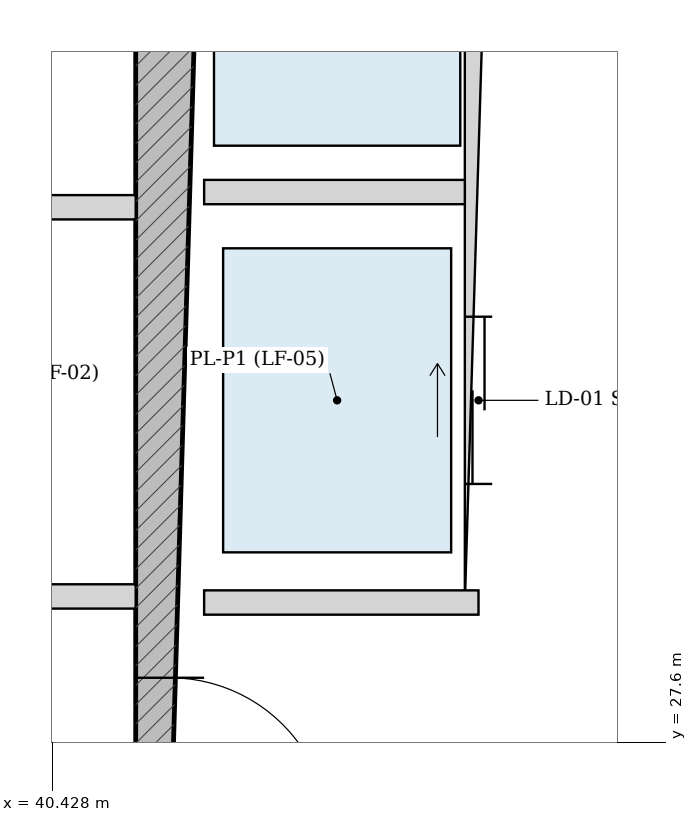
"""IFC4 building model, lengths in metres.
Left out: names, types, materials, properties, quantities, classifications, styles, units other than length and angle.
Written with IfcOpenShell. Run it as: python <this file> out.ifc"""

import sys

from ifc_helpers import new_model, si_unit, direction, frame, frame_2d, origin, place, context, subcontext, project, spatial, rectangle, extrude, source, transform, mapped, element, fill, save


model = new_model("IFC4")
c1 = context("Model", 3, precision=1e-05, world=origin(), true_north=direction((-0.2419218956, 0.970295726276)))
c2 = subcontext(c1, "Body", "Model", "MODEL_VIEW")
j1 = project(units=[si_unit("LENGTHUNIT", "METRE"), si_unit("PLANEANGLEUNIT", "RADIAN")], contexts=[c1])
p1 = place(None, origin())
s1 = spatial("IfcSite", under=j1, at=p1, CompositionType="ELEMENT")
p2 = place(p1, origin())
s2 = spatial("IfcBuilding", under=s1, at=p2, CompositionType="ELEMENT")
p3 = place(p2, frame((0.0, 0.0, 18.9)))
s3 = spatial("IfcBuildingStorey", under=s2, at=p3, CompositionType="ELEMENT", Elevation=18.9)
p4 = place(p3, frame((41.2, 19.175, 0.0), z_axis=(0.0, 0.0, 1.0), x_axis=(0.0, 1.0, 0.0)))
e1 = element("IfcWall", 1, at=p4, inside=s3, PredefinedType="SHEAR", context=c2, shape_type="SweptSolid", body=[
    extrude(rectangle(XDim=15.25, YDim=0.45, at=frame_2d((7.625, 0.0))), origin(), (0.0, 0.0, 1.0), 4.82),
])
p5 = place(p4, frame((7.8, 0.0, 0.0)))
e2 = element("IfcOpeningElement", 2, at=p5, cuts=e1, PredefinedType="OPENING", context=c2, shape_type="SweptSolid", body=[
    extrude(rectangle(XDim=1.05, YDim=2.15, at=frame_2d((0.525, 1.075))), frame((0.0, 0.235, 0.0), z_axis=(0.0, -1.0, 0.0), x_axis=(1.0, 0.0, 0.0)), (0.0, 0.0, 1.0), 0.47),
])
p6 = place(p3, frame((43.23, 28.52, 0.0), z_axis=(0.0, 0.0, 1.0), x_axis=(0.0, 1.0, 0.0)))
e3 = element("IfcWall", 3, at=p6, inside=s3, PredefinedType="PARTITIONING", context=c2, shape_type="SweptSolid", body=[
    extrude(rectangle(XDim=5.905, YDim=0.18, at=frame_2d((2.953, 0.0))), origin(), (0.0, 0.0, 1.0), 4.82),
])
p7 = place(p6, frame((3.655, 0.0, 0.0)))
e4 = element("IfcOpeningElement", 4, at=p7, cuts=e3, PredefinedType="OPENING", context=c2, shape_type="SweptSolid", body=[
    extrude(rectangle(XDim=1.15, YDim=2.2, at=frame_2d((0.575, 1.1))), frame((0.0, 0.1, 0.0), z_axis=(0.0, -1.0, 0.0), x_axis=(1.0, 0.0, 0.0)), (0.0, 0.0, 1.0), 0.2),
])
p8 = place(p6, frame((0.78, 0.0, 0.0)))
e5 = element("IfcOpeningElement", 5, at=p8, cuts=e3, PredefinedType="OPENING", context=c2, shape_type="SweptSolid", body=[
    extrude(rectangle(XDim=1.1, YDim=2.2, at=frame_2d((0.55, 1.1))), frame((0.0, 0.1, 0.0), z_axis=(0.0, -1.0, 0.0), x_axis=(1.0, 0.0, 0.0)), (0.0, 0.0, 1.0), 0.2),
])
p9 = place(p3, frame((41.425, 31.22, 0.0), z_axis=(0.0, 0.0, 1.0), x_axis=(1.0, 0.0, 0.0)))
e6 = element("IfcWall", 6, at=p9, inside=s3, PredefinedType="PARTITIONING", context=c2, shape_type="SweptSolid", body=[
    extrude(rectangle(XDim=1.715, YDim=0.16, at=frame_2d((0.857, 0.0))), origin(), (0.0, 0.0, 1.0), 4.82),
])
p10 = place(p3, frame((41.425, 28.52, 0.0), z_axis=(0.0, 0.0, 1.0), x_axis=(1.0, 0.0, 0.0)))
e7 = element("IfcWall", 7, at=p10, inside=s3, PredefinedType="PARTITIONING", context=c2, shape_type="SweptSolid", body=[
    extrude(rectangle(XDim=1.805, YDim=0.16, at=frame_2d((0.902, 0.0))), origin(), (0.0, 0.0, 1.0), 4.82),
])
p11 = place(p3, frame((35.025, 28.56, 0.0), z_axis=(0.0, 0.0, 1.0), x_axis=(1.0, 0.0, 0.0)))
e8 = element("IfcWall", 8, at=p11, inside=s3, PredefinedType="PARTITIONING", context=c2, shape_type="SweptSolid", body=[
    extrude(rectangle(XDim=5.95, YDim=0.16, at=frame_2d((2.975, 0.0))), origin(), (0.0, 0.0, 1.0), 4.82),
])
p12 = place(p11, frame((0.76, 0.0, 0.0)))
e9 = element("IfcOpeningElement", 9, at=p12, cuts=e8, PredefinedType="OPENING", context=c2, shape_type="SweptSolid", body=[
    extrude(rectangle(XDim=1.1, YDim=2.2, at=frame_2d((0.55, 1.1))), frame((0.0, 0.09, 0.0), z_axis=(0.0, -1.0, 0.0), x_axis=(1.0, 0.0, 0.0)), (0.0, 0.0, 1.0), 0.18),
])
p13 = place(p11, frame((2.425, 0.0, 0.0)))
e10 = element("IfcOpeningElement", 10, at=p13, cuts=e8, PredefinedType="OPENING", context=c2, shape_type="SweptSolid", body=[
    extrude(rectangle(XDim=1.1, YDim=2.2, at=frame_2d((0.55, 1.1))), frame((0.0, 0.09, 0.0), z_axis=(0.0, -1.0, 0.0), x_axis=(1.0, 0.0, 0.0)), (0.0, 0.0, 1.0), 0.18),
])
p14 = place(p11, frame((4.09, 0.0, 0.0)))
e11 = element("IfcOpeningElement", 11, at=p14, cuts=e8, PredefinedType="OPENING", context=c2, shape_type="SweptSolid", body=[
    extrude(rectangle(XDim=1.1, YDim=2.2, at=frame_2d((0.55, 1.1))), frame((0.0, 0.09, 0.0), z_axis=(0.0, -1.0, 0.0), x_axis=(1.0, 0.0, 0.0)), (0.0, 0.0, 1.0), 0.18),
])
p15 = place(p3, frame((35.025, 31.12, 0.0), z_axis=(0.0, 0.0, 1.0), x_axis=(1.0, 0.0, 0.0)))
e12 = element("IfcWall", 12, at=p15, inside=s3, PredefinedType="PARTITIONING", context=c2, shape_type="SweptSolid", body=[
    extrude(rectangle(XDim=5.95, YDim=0.16, at=frame_2d((2.975, 0.0))), origin(), (0.0, 0.0, 1.0), 4.82),
])
m1 = source(origin(), c2, "Body", "SweptSolid", [
    extrude(rectangle(XDim=1.05, YDim=2.15, at=frame_2d((0.525, 1.075))), frame((0.0, 0.025, 0.0), z_axis=(0.0, -1.0, 0.0), x_axis=(1.0, 0.0, 0.0)), (0.0, 0.0, 1.0), 0.05),
])
p16 = place(p5, frame((1.05, 0.0, 0.0), z_axis=(0.0, 0.0, 1.0), x_axis=(-1.0, 0.0, 0.0)))
e13 = element("IfcDoor", 13, at=p16, inside=s3, OperationType="SINGLE_SWING_RIGHT", PredefinedType="DOOR", context=c2, shape_type="MappedRepresentation", body=[
    mapped(m1, transform((0.0, 0.0, 0.0), scale=1.0)),
])
fill(e2, e13)
m2 = source(origin(), c2, "Body", "SweptSolid", [
    extrude(rectangle(XDim=1.1, YDim=2.2, at=frame_2d((0.55, 1.1))), frame((0.0, 0.025, 0.0), z_axis=(0.0, -1.0, 0.0), x_axis=(1.0, 0.0, 0.0)), (0.0, 0.0, 1.0), 0.05),
])
p17 = place(p8, origin())
e14 = element("IfcDoor", 14, at=p17, inside=s3, OperationType="DOUBLE_DOOR_SLIDING", PredefinedType="DOOR", context=c2, shape_type="MappedRepresentation", body=[
    mapped(m2, transform((0.0, 0.0, 0.0), scale=1.0)),
])
fill(e5, e14)
save(model, sys.argv[1])
